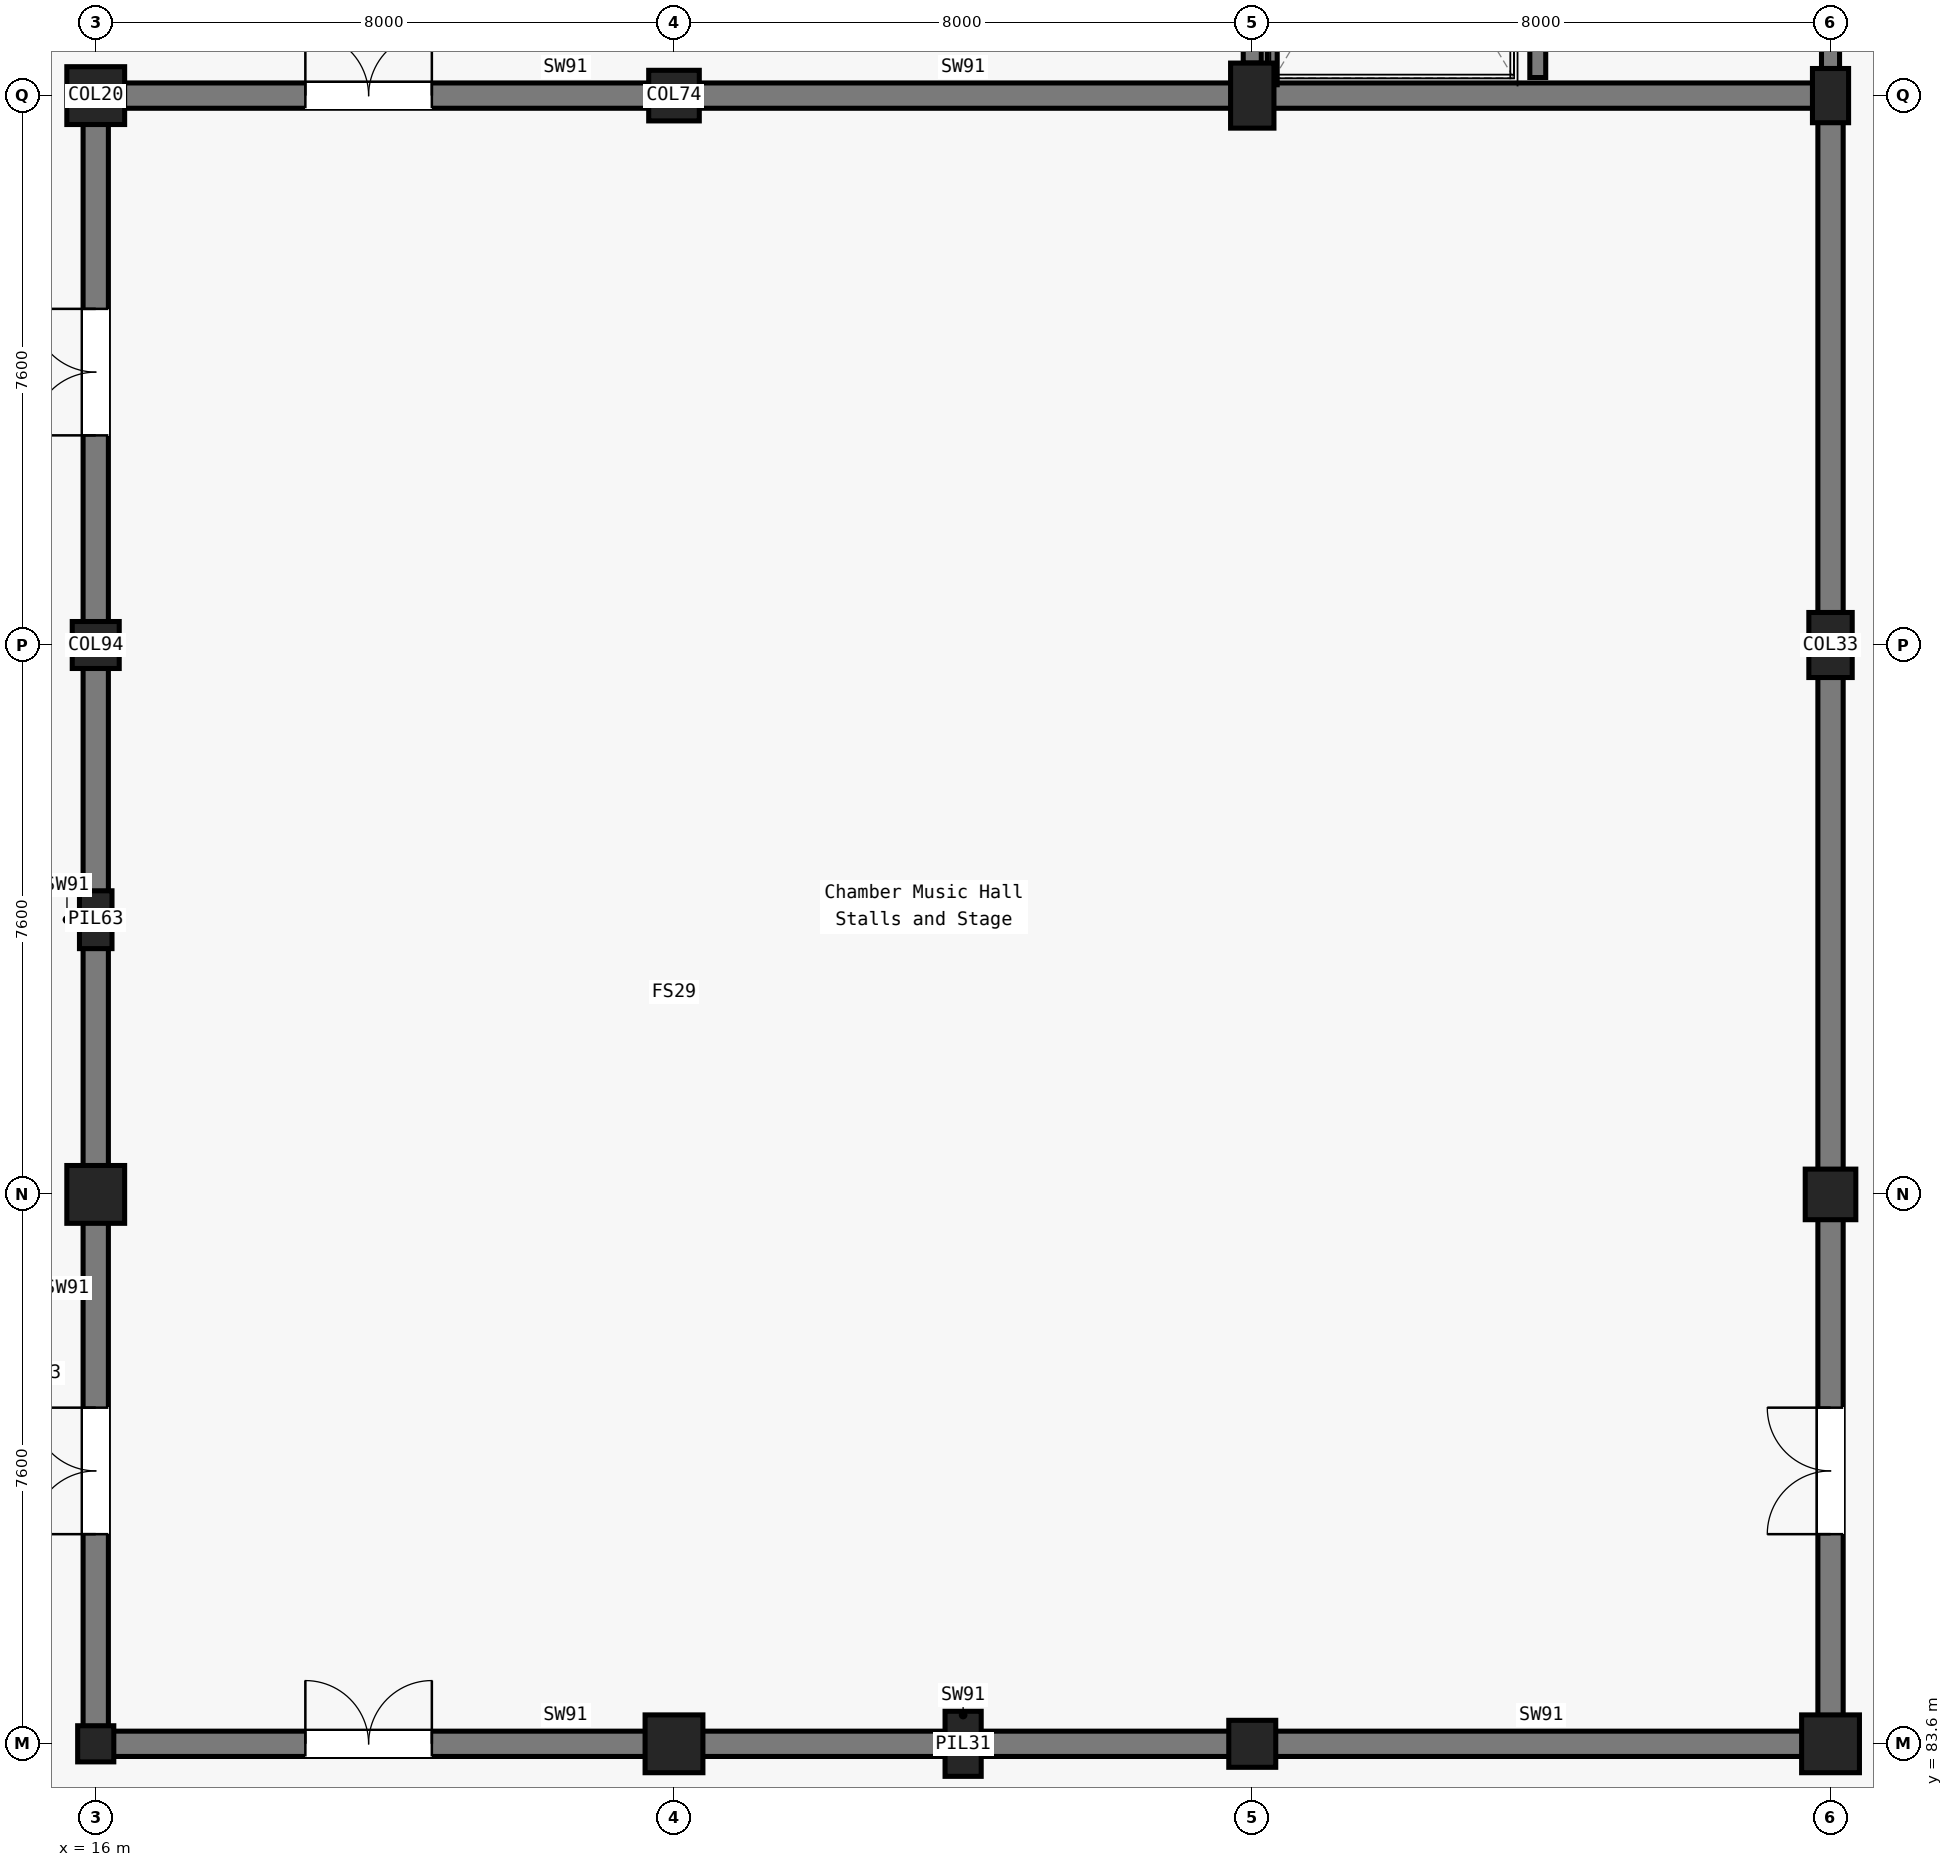
"""IFC4 building model, lengths in metres.
Left out: names, types, materials, properties, quantities, classifications, styles, units other than length and angle.
Written with IfcOpenShell. Run it as: python <this file> out.ifc"""

import sys

from ifc_helpers import new_model, si_unit, direction, frame, frame_2d, origin, origin_2d, place, context, subcontext, project, spatial, rectangle, circle, extrude, element, fill, save


model = new_model("IFC4")
c1 = context("Model", 3, precision=1e-05, world=origin(), true_north=direction((0.0, 1.0)))
c2 = subcontext(c1, "Body", "Model", "MODEL_VIEW")
j1 = project(units=[si_unit("LENGTHUNIT", "METRE"), si_unit("PLANEANGLEUNIT", "RADIAN")], contexts=[c1])
p1 = place(None, origin())
s1 = spatial("IfcSite", under=j1, at=p1, CompositionType="ELEMENT")
p2 = place(p1, origin())
s2 = spatial("IfcBuilding", under=s1, at=p2, CompositionType="ELEMENT")
p3 = place(p2, origin())
s3 = spatial("IfcBuildingStorey", under=s2, at=p3, CompositionType="ELEMENT", Elevation=0.0)
p4 = place(p3, frame((16.0, 83.6, 0.0), z_axis=(0.0, 0.0, 1.0), x_axis=(1.0, 0.0, 0.0)))
e1 = element("IfcColumn", 1, at=p4, inside=s3, PredefinedType="COLUMN", context=c2, shape_type="SweptSolid", body=[
    extrude(rectangle(XDim=0.5, YDim=0.5, at=origin_2d()), origin(), (0.0, 0.0, 1.0), 5.4),
])
p5 = place(p3, frame((16.0, 91.2, 0.0), z_axis=(0.0, 0.0, 1.0), x_axis=(1.0, 0.0, 0.0)))
e2 = element("IfcColumn", 2, at=p5, inside=s3, PredefinedType="COLUMN", context=c2, shape_type="SweptSolid", body=[
    extrude(circle(Radius=0.4, at=origin_2d()), origin(), (0.0, 0.0, 1.0), 5.4),
])
p6 = place(p3, frame((16.0, 98.8, 0.0), z_axis=(0.0, 0.0, 1.0), x_axis=(1.0, 0.0, 0.0)))
e3 = element("IfcColumn", 3, at=p6, inside=s3, PredefinedType="COLUMN", context=c2, shape_type="SweptSolid", body=[
    extrude(circle(Radius=0.325, at=origin_2d()), origin(), (0.0, 0.0, 1.0), 5.4),
])
p7 = place(p3, frame((16.0, 106.4, 0.0), z_axis=(0.0, 0.0, 1.0), x_axis=(1.0, 0.0, 0.0)))
e4 = element("IfcColumn", 4, at=p7, inside=s3, PredefinedType="COLUMN", context=c2, shape_type="SweptSolid", body=[
    extrude(rectangle(XDim=0.8, YDim=0.8, at=origin_2d()), origin(), (0.0, 0.0, 1.0), 5.4),
])
p8 = place(p3, frame((24.0, 83.6, 0.0), z_axis=(0.0, 0.0, 1.0), x_axis=(1.0, 0.0, 0.0)))
e5 = element("IfcColumn", 5, at=p8, inside=s3, PredefinedType="COLUMN", context=c2, shape_type="SweptSolid", body=[
    extrude(circle(Radius=0.4, at=origin_2d()), origin(), (0.0, 0.0, 1.0), 5.4),
])
p9 = place(p3, frame((24.0, 106.4, 0.0), z_axis=(0.0, 0.0, 1.0), x_axis=(1.0, 0.0, 0.0)))
e6 = element("IfcColumn", 6, at=p9, inside=s3, PredefinedType="COLUMN", context=c2, shape_type="SweptSolid", body=[
    extrude(rectangle(XDim=0.7, YDim=0.7, at=origin_2d()), origin(), (0.0, 0.0, 1.0), 5.4),
])
p10 = place(p3, frame((32.0, 83.6, 0.0), z_axis=(0.0, 0.0, 1.0), x_axis=(1.0, 0.0, 0.0)))
e7 = element("IfcColumn", 7, at=p10, inside=s3, PredefinedType="COLUMN", context=c2, shape_type="SweptSolid", body=[
    extrude(circle(Radius=0.325, at=origin_2d()), origin(), (0.0, 0.0, 1.0), 5.4),
])
p11 = place(p3, frame((32.0, 106.4, 0.0), z_axis=(0.0, 0.0, 1.0), x_axis=(1.0, 0.0, 0.0)))
e8 = element("IfcColumn", 8, at=p11, inside=s3, PredefinedType="COLUMN", context=c2, shape_type="SweptSolid", body=[
    extrude(rectangle(XDim=0.6, YDim=0.9, at=origin_2d()), origin(), (0.0, 0.0, 1.0), 5.4),
])
p12 = place(p3, frame((40.0, 83.6, 0.0), z_axis=(0.0, 0.0, 1.0), x_axis=(1.0, 0.0, 0.0)))
e9 = element("IfcColumn", 9, at=p12, inside=s3, PredefinedType="COLUMN", context=c2, shape_type="SweptSolid", body=[
    extrude(rectangle(XDim=0.8, YDim=0.8, at=origin_2d()), origin(), (0.0, 0.0, 1.0), 5.4),
])
p13 = place(p3, frame((40.0, 91.2, 0.0), z_axis=(0.0, 0.0, 1.0), x_axis=(1.0, 0.0, 0.0)))
e10 = element("IfcColumn", 10, at=p13, inside=s3, PredefinedType="COLUMN", context=c2, shape_type="SweptSolid", body=[
    extrude(rectangle(XDim=0.7, YDim=0.7, at=origin_2d()), origin(), (0.0, 0.0, 1.0), 5.4),
])
p14 = place(p3, frame((40.0, 98.8, 0.0), z_axis=(0.0, 0.0, 1.0), x_axis=(1.0, 0.0, 0.0)))
e11 = element("IfcColumn", 11, at=p14, inside=s3, PredefinedType="COLUMN", context=c2, shape_type="SweptSolid", body=[
    extrude(rectangle(XDim=0.6, YDim=0.9, at=origin_2d()), origin(), (0.0, 0.0, 1.0), 5.4),
])
p15 = place(p3, frame((40.0, 106.4, 0.0), z_axis=(0.0, 0.0, 1.0), x_axis=(1.0, 0.0, 0.0)))
e12 = element("IfcColumn", 12, at=p15, inside=s3, PredefinedType="COLUMN", context=c2, shape_type="SweptSolid", body=[
    extrude(rectangle(XDim=0.5, YDim=0.75, at=origin_2d()), origin(), (0.0, 0.0, 1.0), 5.4),
])
p16 = place(p3, frame((16.0, 95.0, 0.0), z_axis=(0.0, 0.0, 1.0), x_axis=(1.0, 0.0, 0.0)))
e13 = element("IfcColumn", 13, at=p16, inside=s3, PredefinedType="PILASTER", context=c2, shape_type="SweptSolid", body=[
    extrude(rectangle(XDim=0.45, YDim=0.8, at=origin_2d()), origin(), (0.0, 0.0, 1.0), 5.4),
])
p17 = place(p3, frame((28.0, 83.6, 0.0), z_axis=(0.0, 0.0, 1.0), x_axis=(1.0, 0.0, 0.0)))
e14 = element("IfcColumn", 14, at=p17, inside=s3, PredefinedType="PILASTER", context=c2, shape_type="SweptSolid", body=[
    extrude(rectangle(XDim=0.5, YDim=0.9, at=origin_2d()), origin(), (0.0, 0.0, 1.0), 5.4),
])
p18 = place(p3, frame((16.0, 83.6, 0.0), z_axis=(0.0, 0.0, 1.0), x_axis=(1.0, 0.0, 0.0)))
e15 = element("IfcWall", 15, at=p18, inside=s3, PredefinedType="SHEAR", context=c2, shape_type="SweptSolid", body=[
    extrude(rectangle(XDim=8.0, YDim=0.35, at=frame_2d((4.0, 0.0))), origin(), (0.0, 0.0, 1.0), 5.1),
])
p19 = place(p18, frame((2.9, 0.0, 0.0)))
e16 = element("IfcOpeningElement", 16, at=p19, cuts=e15, PredefinedType="OPENING", context=c2, shape_type="SweptSolid", body=[
    extrude(rectangle(XDim=1.75, YDim=2.25, at=frame_2d((0.875, 1.125))), frame((0.0, 0.185, 0.0), z_axis=(0.0, -1.0, 0.0), x_axis=(1.0, 0.0, 0.0)), (0.0, 0.0, 1.0), 0.37),
])
for number, where, z_axis, x_axis in (
    (17, (24.0, 83.6, 0.0), (0.0, 0.0, 1.0), (1.0, 0.0, 0.0)),
    (18, (32.0, 83.6, 0.0), (0.0, 0.0, 1.0), (1.0, 0.0, 0.0)),
):
    element("IfcWall", number, at=place(p3, frame(where, z_axis=z_axis, x_axis=x_axis)), inside=s3, PredefinedType="SHEAR", context=c2, shape_type="SweptSolid", body=[
        extrude(rectangle(XDim=8.0, YDim=0.35, at=frame_2d((4.0, 0.0))), origin(), (0.0, 0.0, 1.0), 5.1),
    ])
p20 = place(p3, frame((16.0, 106.4, 0.0), z_axis=(0.0, 0.0, 1.0), x_axis=(1.0, 0.0, 0.0)))
e19 = element("IfcWall", 19, at=p20, inside=s3, PredefinedType="SHEAR", context=c2, shape_type="SweptSolid", body=[
    extrude(rectangle(XDim=8.0, YDim=0.35, at=frame_2d((4.0, 0.0))), origin(), (0.0, 0.0, 1.0), 5.1),
])
p21 = place(p20, frame((2.9, 0.0, 0.0)))
e20 = element("IfcOpeningElement", 20, at=p21, cuts=e19, PredefinedType="OPENING", context=c2, shape_type="SweptSolid", body=[
    extrude(rectangle(XDim=1.75, YDim=2.25, at=frame_2d((0.875, 1.125))), frame((0.0, 0.185, 0.0), z_axis=(0.0, -1.0, 0.0), x_axis=(1.0, 0.0, 0.0)), (0.0, 0.0, 1.0), 0.37),
])
for number, where, z_axis, x_axis in (
    (21, (24.0, 106.4, 0.0), (0.0, 0.0, 1.0), (1.0, 0.0, 0.0)),
    (22, (32.0, 106.4, 0.0), (0.0, 0.0, 1.0), (1.0, 0.0, 0.0)),
):
    element("IfcWall", number, at=place(p3, frame(where, z_axis=z_axis, x_axis=x_axis)), inside=s3, PredefinedType="SHEAR", context=c2, shape_type="SweptSolid", body=[
        extrude(rectangle(XDim=8.0, YDim=0.35, at=frame_2d((4.0, 0.0))), origin(), (0.0, 0.0, 1.0), 5.1),
    ])
p22 = place(p3, frame((16.0, 83.6, 0.0), z_axis=(0.0, 0.0, 1.0), x_axis=(0.0, 1.0, 0.0)))
e23 = element("IfcWall", 23, at=p22, inside=s3, PredefinedType="SHEAR", context=c2, shape_type="SweptSolid", body=[
    extrude(rectangle(XDim=7.6, YDim=0.35, at=frame_2d((3.8, 0.0))), origin(), (0.0, 0.0, 1.0), 5.1),
])
p23 = place(p22, frame((2.9, 0.0, 0.0)))
e24 = element("IfcOpeningElement", 24, at=p23, cuts=e23, PredefinedType="OPENING", context=c2, shape_type="SweptSolid", body=[
    extrude(rectangle(XDim=1.75, YDim=2.25, at=frame_2d((0.875, 1.125))), frame((0.0, 0.185, 0.0), z_axis=(0.0, -1.0, 0.0), x_axis=(1.0, 0.0, 0.0)), (0.0, 0.0, 1.0), 0.37),
])
p24 = place(p3, frame((16.0, 91.2, 0.0), z_axis=(0.0, 0.0, 1.0), x_axis=(0.0, 1.0, 0.0)))
e25 = element("IfcWall", 25, at=p24, inside=s3, PredefinedType="SHEAR", context=c2, shape_type="SweptSolid", body=[
    extrude(rectangle(XDim=7.6, YDim=0.35, at=frame_2d((3.8, 0.0))), origin(), (0.0, 0.0, 1.0), 5.1),
])
p25 = place(p3, frame((16.0, 98.8, 0.0), z_axis=(0.0, 0.0, 1.0), x_axis=(0.0, 1.0, 0.0)))
e26 = element("IfcWall", 26, at=p25, inside=s3, PredefinedType="SHEAR", context=c2, shape_type="SweptSolid", body=[
    extrude(rectangle(XDim=7.6, YDim=0.35, at=frame_2d((3.8, 0.0))), origin(), (0.0, 0.0, 1.0), 5.1),
])
p26 = place(p25, frame((2.9, 0.0, 0.0)))
e27 = element("IfcOpeningElement", 27, at=p26, cuts=e26, PredefinedType="OPENING", context=c2, shape_type="SweptSolid", body=[
    extrude(rectangle(XDim=1.75, YDim=2.25, at=frame_2d((0.875, 1.125))), frame((0.0, 0.185, 0.0), z_axis=(0.0, -1.0, 0.0), x_axis=(1.0, 0.0, 0.0)), (0.0, 0.0, 1.0), 0.37),
])
p27 = place(p3, frame((40.0, 83.6, 0.0), z_axis=(0.0, 0.0, 1.0), x_axis=(0.0, 1.0, 0.0)))
e28 = element("IfcWall", 28, at=p27, inside=s3, PredefinedType="SHEAR", context=c2, shape_type="SweptSolid", body=[
    extrude(rectangle(XDim=7.6, YDim=0.35, at=frame_2d((3.8, 0.0))), origin(), (0.0, 0.0, 1.0), 5.1),
])
p28 = place(p27, frame((2.9, 0.0, 0.0)))
e29 = element("IfcOpeningElement", 29, at=p28, cuts=e28, PredefinedType="OPENING", context=c2, shape_type="SweptSolid", body=[
    extrude(rectangle(XDim=1.75, YDim=2.25, at=frame_2d((0.875, 1.125))), frame((0.0, 0.185, 0.0), z_axis=(0.0, -1.0, 0.0), x_axis=(1.0, 0.0, 0.0)), (0.0, 0.0, 1.0), 0.37),
])
p29 = place(p3, frame((40.0, 91.2, 0.0), z_axis=(0.0, 0.0, 1.0), x_axis=(0.0, 1.0, 0.0)))
e30 = element("IfcWall", 30, at=p29, inside=s3, PredefinedType="SHEAR", context=c2, shape_type="SweptSolid", body=[
    extrude(rectangle(XDim=7.6, YDim=0.35, at=frame_2d((3.8, 0.0))), origin(), (0.0, 0.0, 1.0), 5.1),
])
p30 = place(p3, frame((40.0, 98.8, 0.0), z_axis=(0.0, 0.0, 1.0), x_axis=(0.0, 1.0, 0.0)))
e31 = element("IfcWall", 31, at=p30, inside=s3, PredefinedType="SHEAR", context=c2, shape_type="SweptSolid", body=[
    extrude(rectangle(XDim=7.6, YDim=0.35, at=frame_2d((3.8, 0.0))), origin(), (0.0, 0.0, 1.0), 5.1),
])
p31 = place(p3, frame((32.0, 106.85, 0.0), z_axis=(0.0, 0.0, 1.0), x_axis=(0.0, 1.0, 0.0)))
e32 = element("IfcWall", 32, at=p31, inside=s3, PredefinedType="SOLIDWALL", context=c2, shape_type="SweptSolid", body=[
    extrude(rectangle(XDim=6.775, YDim=0.25, at=frame_2d((3.387, 0.0))), origin(), (0.0, 0.0, 1.0), 4.35),
])
p32 = place(p3, frame((35.95, 106.65, 0.0), z_axis=(0.0, 0.0, 1.0), x_axis=(0.0, 1.0, 0.0)))
e33 = element("IfcWall", 33, at=p32, inside=s3, PredefinedType="SOLIDWALL", context=c2, shape_type="SweptSolid", body=[
    extrude(rectangle(XDim=7.1, YDim=0.22, at=frame_2d((3.55, 0.0))), origin(), (0.0, 0.0, 1.0), 5.1),
])
p33 = place(p32, frame((5.55, 0.0, 0.0)))
e34 = element("IfcOpeningElement", 34, at=p33, cuts=e33, PredefinedType="OPENING", context=c2, shape_type="SweptSolid", body=[
    extrude(rectangle(XDim=1.2, YDim=2.15, at=frame_2d((0.6, 1.075))), frame((0.0, 0.12, 0.0), z_axis=(0.0, -1.0, 0.0), x_axis=(1.0, 0.0, 0.0)), (0.0, 0.0, 1.0), 0.24),
])
p34 = place(p3, frame((40.0, 106.775, 0.0), z_axis=(0.0, 0.0, 1.0), x_axis=(0.0, 1.0, 0.0)))
e35 = element("IfcWall", 35, at=p34, inside=s3, PredefinedType="SOLIDWALL", context=c2, shape_type="SweptSolid", body=[
    extrude(rectangle(XDim=6.925, YDim=0.25, at=frame_2d((3.462, 0.0))), origin(), (0.0, 0.0, 1.0), 4.325),
])
p35 = place(p34, frame((3.475, 0.0, 0.0)))
e36 = element("IfcOpeningElement", 36, at=p35, cuts=e35, PredefinedType="OPENING", context=c2, shape_type="SweptSolid", body=[
    extrude(rectangle(XDim=1.35, YDim=2.2, at=frame_2d((0.675, 1.1))), frame((0.0, 0.135, 0.0), z_axis=(0.0, -1.0, 0.0), x_axis=(1.0, 0.0, 0.0)), (0.0, 0.0, 1.0), 0.27),
])
p36 = place(p3, frame((32.275, 106.55, 0.0), z_axis=(0.0, 0.0, 1.0), x_axis=(0.0, 1.0, 0.0)))
e37 = element("IfcWall", 37, at=p36, inside=s3, PredefinedType="SOLIDWALL", context=c2, shape_type="SweptSolid", body=[
    extrude(rectangle(XDim=7.3, YDim=0.14, at=frame_2d((3.65, 0.0))), origin(), (0.0, 0.0, 1.0), 5.1),
])
p37 = place(p23, origin())
e38 = element("IfcDoor", 38, at=p37, inside=s3, OperationType="DOUBLE_DOOR_SINGLE_SWING", PredefinedType="DOOR", context=c2, shape_type="SweptSolid", body=[
    extrude(rectangle(XDim=1.75, YDim=2.25, at=frame_2d((0.875, 1.125))), frame((0.0, 0.025, 0.0), z_axis=(0.0, -1.0, 0.0), x_axis=(1.0, 0.0, 0.0)), (0.0, 0.0, 1.0), 0.05),
])
fill(e24, e38)
p38 = place(p26, origin())
e39 = element("IfcDoor", 39, at=p38, inside=s3, OperationType="DOUBLE_DOOR_SINGLE_SWING", PredefinedType="DOOR", context=c2, shape_type="SweptSolid", body=[
    extrude(rectangle(XDim=1.75, YDim=2.25, at=frame_2d((0.875, 1.125))), frame((0.0, 0.025, 0.0), z_axis=(0.0, -1.0, 0.0), x_axis=(1.0, 0.0, 0.0)), (0.0, 0.0, 1.0), 0.05),
])
fill(e27, e39)
p39 = place(p19, origin())
e40 = element("IfcDoor", 40, at=p39, inside=s3, OperationType="DOUBLE_DOOR_SINGLE_SWING", PredefinedType="DOOR", context=c2, shape_type="SweptSolid", body=[
    extrude(rectangle(XDim=1.75, YDim=2.25, at=frame_2d((0.875, 1.125))), frame((0.0, 0.025, 0.0), z_axis=(0.0, -1.0, 0.0), x_axis=(1.0, 0.0, 0.0)), (0.0, 0.0, 1.0), 0.05),
])
fill(e16, e40)
p40 = place(p21, origin())
e41 = element("IfcDoor", 41, at=p40, inside=s3, OperationType="DOUBLE_DOOR_SINGLE_SWING", PredefinedType="DOOR", context=c2, shape_type="SweptSolid", body=[
    extrude(rectangle(XDim=1.75, YDim=2.25, at=frame_2d((0.875, 1.125))), frame((0.0, 0.025, 0.0), z_axis=(0.0, -1.0, 0.0), x_axis=(1.0, 0.0, 0.0)), (0.0, 0.0, 1.0), 0.05),
])
fill(e20, e41)
p41 = place(p28, origin())
e42 = element("IfcDoor", 42, at=p41, inside=s3, OperationType="DOUBLE_DOOR_SINGLE_SWING", PredefinedType="DOOR", context=c2, shape_type="SweptSolid", body=[
    extrude(rectangle(XDim=1.75, YDim=2.25, at=frame_2d((0.875, 1.125))), frame((0.0, 0.025, 0.0), z_axis=(0.0, -1.0, 0.0), x_axis=(1.0, 0.0, 0.0)), (0.0, 0.0, 1.0), 0.05),
])
fill(e29, e42)
save(model, sys.argv[1])
